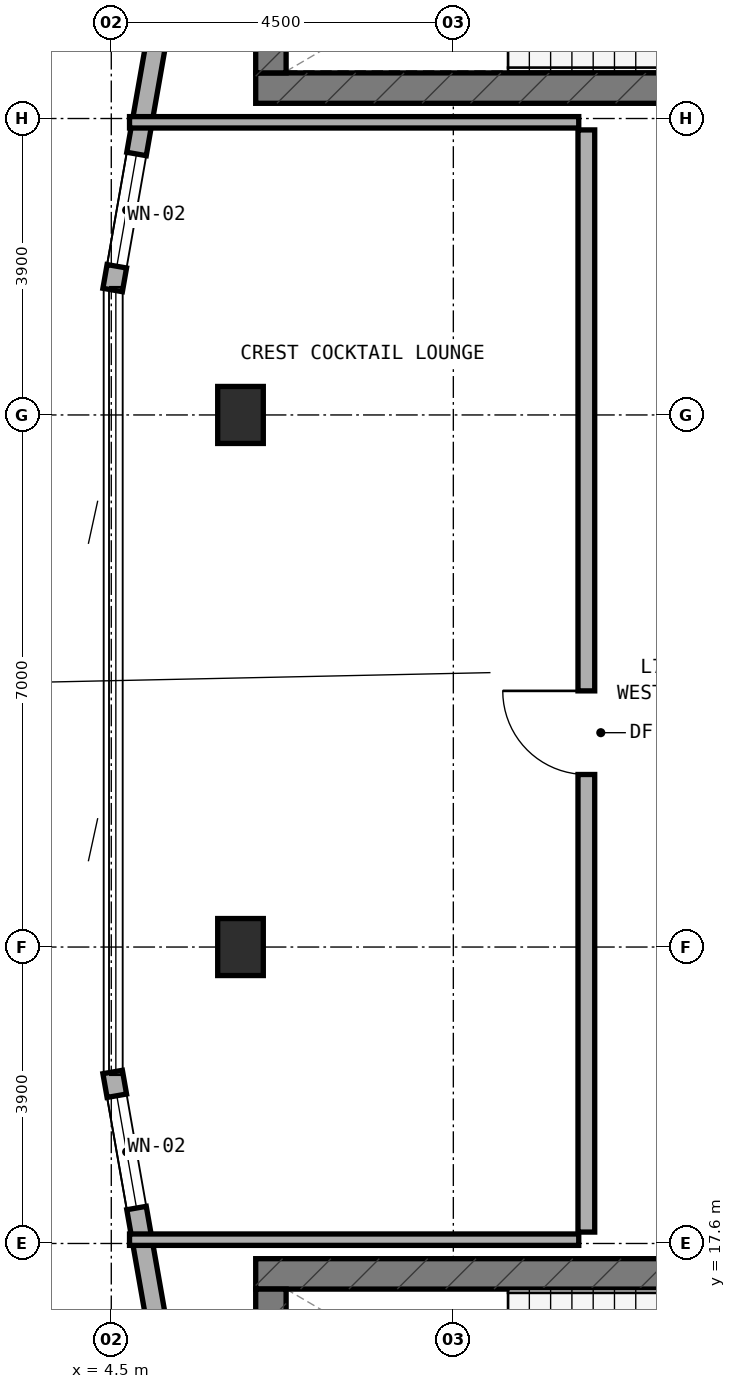
"""IFC4 building model, lengths in metres.
Left out: names, types, materials, properties, quantities, classifications, styles, units other than length and angle.
Written with IfcOpenShell. Run it as: python <this file> out.ifc"""

import sys

from ifc_helpers import new_model, si_unit, direction, frame, frame_2d, origin, origin_2d, place, context, subcontext, project, spatial, rectangle, extrude, element, fill, save


model = new_model("IFC4")
c1 = context("Model", 3, precision=1e-05, world=origin(), true_north=direction((0.0, 1.0)))
c2 = subcontext(c1, "Body", "Model", "MODEL_VIEW")
j1 = project(units=[si_unit("LENGTHUNIT", "METRE"), si_unit("PLANEANGLEUNIT", "RADIAN")], contexts=[c1])
p1 = place(None, origin())
s1 = spatial("IfcSite", under=j1, at=p1, CompositionType="ELEMENT")
p2 = place(p1, origin())
s2 = spatial("IfcBuilding", under=s1, at=p2, CompositionType="ELEMENT")
p3 = place(p2, frame((0.0, 0.0, 268.4)))
s3 = spatial("IfcBuildingStorey", under=s2, at=p3, CompositionType="ELEMENT", Elevation=268.4)
p4 = place(p3, frame((6.4, 32.8, 0.0), z_axis=(0.0, 0.0, 1.0), x_axis=(1.0, 0.0, 0.0)))
e1 = element("IfcWall", 1, at=p4, inside=s3, PredefinedType="SHEAR", context=c2, shape_type="SweptSolid", body=[
    extrude(rectangle(XDim=24.4, YDim=0.4, at=frame_2d((12.2, 0.0))), origin(), (0.0, 0.0, 1.0), 3.6),
])
p5 = place(p4, frame((6.05, 0.0, 0.0)))
e2 = element("IfcOpeningElement", 2, at=p5, cuts=e1, PredefinedType="OPENING", context=c2, shape_type="SweptSolid", body=[
    extrude(rectangle(XDim=1.1, YDim=2.15, at=frame_2d((0.55, 1.075))), frame((0.0, 0.21, 0.0), z_axis=(0.0, -1.0, 0.0), x_axis=(1.0, 0.0, 0.0)), (0.0, 0.0, 1.0), 0.42),
])
p6 = place(p3, frame((6.6, 33.0, 0.0), z_axis=(0.0, 0.0, 1.0), x_axis=(0.0, 1.0, 0.0)))
e3 = element("IfcWall", 3, at=p6, inside=s3, PredefinedType="SHEAR", context=c2, shape_type="SweptSolid", body=[
    extrude(rectangle(XDim=3.16, YDim=0.4, at=frame_2d((1.58, 0.0))), origin(), (0.0, 0.0, 1.0), 3.6),
])
p7 = place(p3, frame((6.4, 17.2, 0.0), z_axis=(0.0, 0.0, 1.0), x_axis=(1.0, 0.0, 0.0)))
e4 = element("IfcWall", 4, at=p7, inside=s3, PredefinedType="SHEAR", context=c2, shape_type="SweptSolid", body=[
    extrude(rectangle(XDim=24.4, YDim=0.4, at=frame_2d((12.2, 0.0))), origin(), (0.0, 0.0, 1.0), 3.6),
])
p8 = place(p3, frame((6.6, 13.84, 0.0), z_axis=(0.0, 0.0, 1.0), x_axis=(0.0, 1.0, 0.0)))
e5 = element("IfcWall", 5, at=p8, inside=s3, PredefinedType="SHEAR", context=c2, shape_type="SweptSolid", body=[
    extrude(rectangle(XDim=3.16, YDim=0.4, at=frame_2d((1.58, 0.0))), origin(), (0.0, 0.0, 1.0), 3.6),
])
for number, where, z_axis, x_axis in (
    (6, (6.2, 21.5, 0.0), (0.0, 0.0, 1.0), (1.0, 0.0, 0.0)),
    (7, (6.2, 28.5, 0.0), (0.0, 0.0, 1.0), (1.0, 0.0, 0.0)),
):
    element("IfcColumn", number, at=place(p3, frame(where, z_axis=z_axis, x_axis=x_axis)), inside=s3, PredefinedType="COLUMN", context=c2, shape_type="SweptSolid", body=[
        extrude(rectangle(XDim=0.6, YDim=0.75, at=origin_2d()), origin(), (0.0, 0.0, 1.0), 3.6),
    ])
p9 = place(p3, frame((5.929, 38.186, 0.0), z_axis=(0.0, 0.0, 1.0), x_axis=(-0.172801004781, -0.98495675679, 0.0)))
e8 = element("IfcWall", 8, at=p9, inside=s3, PredefinedType="STANDARD", context=c2, shape_type="SweptSolid", body=[
    extrude(rectangle(XDim=8.165, YDim=0.26, at=frame_2d((4.083, 0.0))), origin(), (0.0, 0.0, 1.0), 3.32),
])
p10 = place(p9, frame((1.855, 0.0, 0.85)))
e9 = element("IfcOpeningElement", 9, at=p10, cuts=e8, PredefinedType="OPENING", context=c2, shape_type="SweptSolid", body=[
    extrude(rectangle(XDim=2.1, YDim=1.5, at=frame_2d((1.05, 0.75))), frame((0.0, 0.14, 0.0), z_axis=(0.0, -1.0, 0.0), x_axis=(1.0, 0.0, 0.0)), (0.0, 0.0, 1.0), 0.28),
])
p11 = place(p9, frame((6.348, 0.0, 0.85)))
e10 = element("IfcOpeningElement", 10, at=p11, cuts=e8, PredefinedType="OPENING", context=c2, shape_type="SweptSolid", body=[
    extrude(rectangle(XDim=1.5, YDim=1.5, at=frame_2d((0.75, 0.75))), frame((0.0, 0.14, 0.0), z_axis=(0.0, -1.0, 0.0), x_axis=(1.0, 0.0, 0.0)), (0.0, 0.0, 1.0), 0.28),
])
p12 = place(p3, frame((4.518, 19.856, 0.0), z_axis=(0.0, 0.0, 1.0), x_axis=(0.172801004781, -0.98495675679, 0.0)))
e11 = element("IfcWall", 11, at=p12, inside=s3, PredefinedType="STANDARD", context=c2, shape_type="SweptSolid", body=[
    extrude(rectangle(XDim=8.165, YDim=0.26, at=frame_2d((4.083, 0.0))), origin(), (0.0, 0.0, 1.0), 3.32),
])
p13 = place(p12, frame((0.317, 0.0, 0.85)))
e12 = element("IfcOpeningElement", 12, at=p13, cuts=e11, PredefinedType="OPENING", context=c2, shape_type="SweptSolid", body=[
    extrude(rectangle(XDim=1.5, YDim=1.5, at=frame_2d((0.75, 0.75))), frame((0.0, 0.14, 0.0), z_axis=(0.0, -1.0, 0.0), x_axis=(1.0, 0.0, 0.0)), (0.0, 0.0, 1.0), 0.28),
])
p14 = place(p12, frame((4.21, 0.0, 0.85)))
e13 = element("IfcOpeningElement", 13, at=p14, cuts=e11, PredefinedType="OPENING", context=c2, shape_type="SweptSolid", body=[
    extrude(rectangle(XDim=2.1, YDim=1.5, at=frame_2d((1.05, 0.75))), frame((0.0, 0.14, 0.0), z_axis=(0.0, -1.0, 0.0), x_axis=(1.0, 0.0, 0.0)), (0.0, 0.0, 1.0), 0.28),
])
for number, where, z_axis, x_axis in (
    (14, (4.74, 17.65, 0.0), (0.0, 0.0, 1.0), (1.0, 0.0, 0.0)),
    (15, (4.74, 32.35, 0.0), (0.0, 0.0, 1.0), (1.0, 0.0, 0.0)),
):
    element("IfcWall", number, at=place(p3, frame(where, z_axis=z_axis, x_axis=x_axis)), inside=s3, PredefinedType="PARTITIONING", context=c2, shape_type="SweptSolid", body=[
        extrude(rectangle(XDim=5.91, YDim=0.15, at=frame_2d((2.955, 0.0))), origin(), (0.0, 0.0, 1.0), 3.32),
    ])
p15 = place(p3, frame((10.75, 17.75, 0.0), z_axis=(0.0, 0.0, 1.0), x_axis=(0.0, 1.0, 0.0)))
e16 = element("IfcWall", 16, at=p15, inside=s3, PredefinedType="SOLIDWALL", context=c2, shape_type="SweptSolid", body=[
    extrude(rectangle(XDim=14.5, YDim=0.22, at=frame_2d((7.25, 0.0))), origin(), (0.0, 0.0, 1.0), 2.795),
])
p16 = place(p15, frame((6.02, 0.0, 0.0)))
e17 = element("IfcOpeningElement", 17, at=p16, cuts=e16, PredefinedType="OPENING", context=c2, shape_type="SweptSolid", body=[
    extrude(rectangle(XDim=1.1, YDim=2.1, at=frame_2d((0.55, 1.05))), frame((0.0, 0.12, 0.0), z_axis=(0.0, -1.0, 0.0), x_axis=(1.0, 0.0, 0.0)), (0.0, 0.0, 1.0), 0.24),
])
p17 = place(p11, origin())
e18 = element("IfcWindow", 18, at=p17, inside=s3, PartitioningType="SINGLE_PANEL", PredefinedType="WINDOW", context=c2, shape_type="SweptSolid", body=[
    extrude(rectangle(XDim=1.5, YDim=1.5, at=frame_2d((0.75, 0.75))), frame((0.0, 0.03, 0.0), z_axis=(0.0, -1.0, 0.0), x_axis=(1.0, 0.0, 0.0)), (0.0, 0.0, 1.0), 0.06),
])
fill(e10, e18)
p18 = place(p13, origin())
e19 = element("IfcWindow", 19, at=p18, inside=s3, PartitioningType="SINGLE_PANEL", PredefinedType="WINDOW", context=c2, shape_type="SweptSolid", body=[
    extrude(rectangle(XDim=1.5, YDim=1.5, at=frame_2d((0.75, 0.75))), frame((0.0, 0.03, 0.0), z_axis=(0.0, -1.0, 0.0), x_axis=(1.0, 0.0, 0.0)), (0.0, 0.0, 1.0), 0.06),
])
fill(e12, e19)
p19 = place(p16, origin())
e20 = element("IfcDoor", 20, at=p19, inside=s3, OperationType="SINGLE_SWING_RIGHT", PredefinedType="DOOR", context=c2, shape_type="SweptSolid", body=[
    extrude(rectangle(XDim=1.1, YDim=2.1, at=frame_2d((0.55, 1.05))), frame((0.0, 0.025, 0.0), z_axis=(0.0, -1.0, 0.0), x_axis=(1.0, 0.0, 0.0)), (0.0, 0.0, 1.0), 0.05),
])
fill(e17, e20)
save(model, sys.argv[1])
